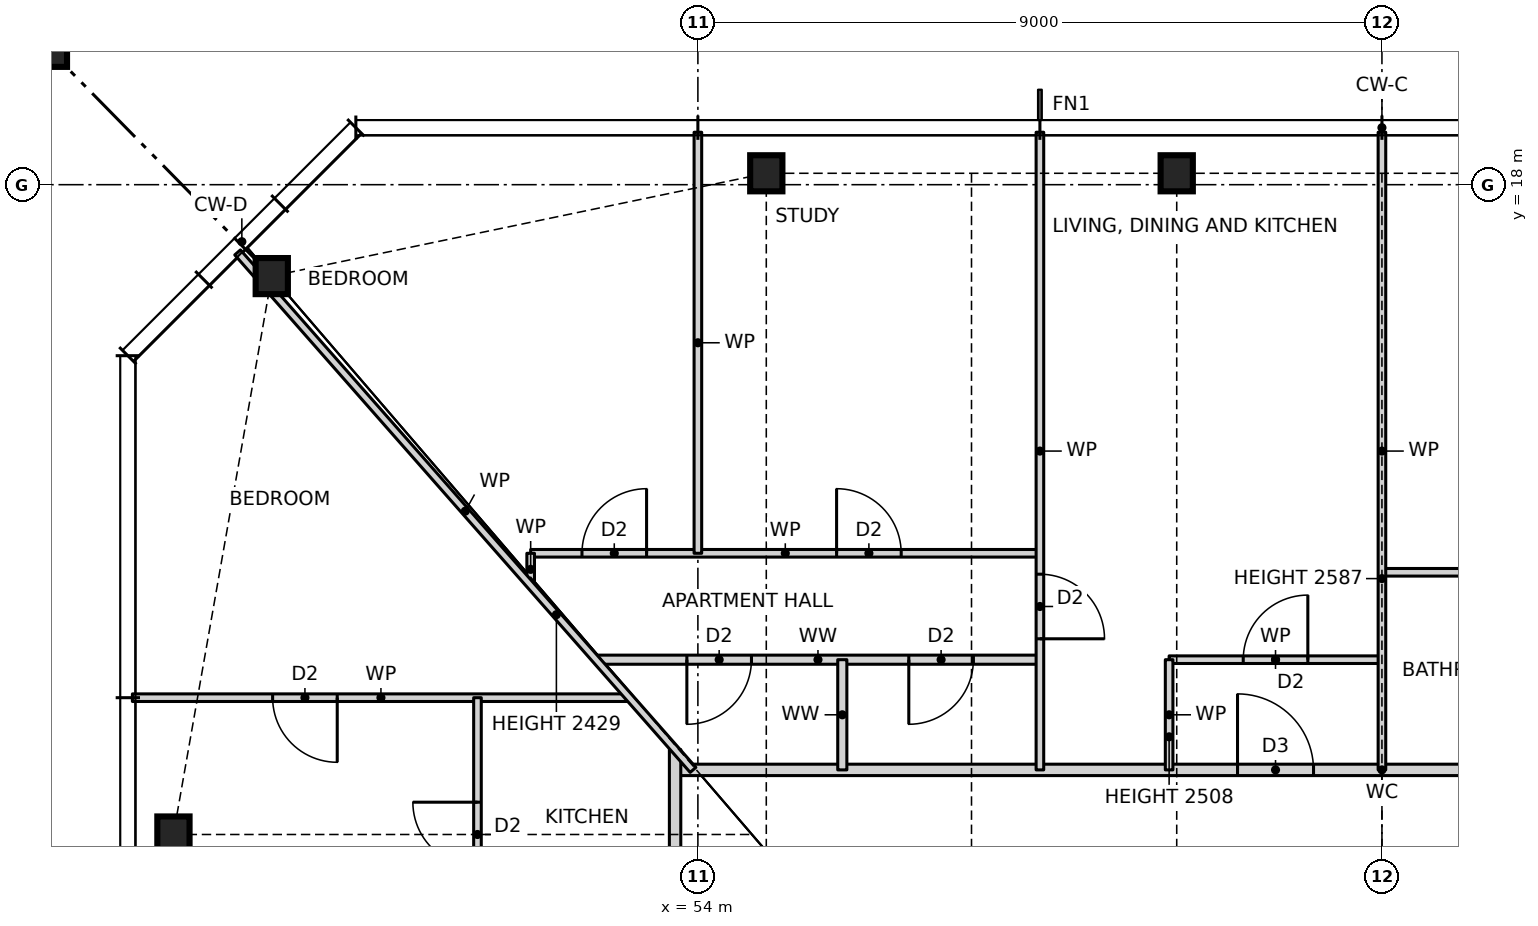
"""IFC4 building model, lengths in metres.
Left out: names, types, materials, properties, quantities, classifications, styles, units other than length and angle.
Written with IfcOpenShell. Run it as: python <this file> out.ifc"""

import sys

from ifc_helpers import new_model, si_unit, direction, frame, frame_2d, origin, origin_2d, place, context, subcontext, project, spatial, rectangle, hollow_rectangle, i_section, extrude, element, fill, save


model = new_model("IFC4")
c1 = context("Model", 3, precision=1e-05, world=origin(), true_north=direction((0.0, 1.0)))
c2 = subcontext(c1, "Body", "Model", "MODEL_VIEW")
j1 = project(units=[si_unit("LENGTHUNIT", "METRE"), si_unit("PLANEANGLEUNIT", "RADIAN")], contexts=[c1])
p1 = place(None, origin())
s1 = spatial("IfcSite", under=j1, at=p1, CompositionType="ELEMENT")
p2 = place(p1, origin())
s2 = spatial("IfcBuilding", under=s1, at=p2, CompositionType="ELEMENT")
p3 = place(p2, frame((0.0, 0.0, 67.5)))
s3 = spatial("IfcBuildingStorey", under=s2, at=p3, CompositionType="ELEMENT", Elevation=67.5)
for number, where, z_axis, x_axis in (
    (1, (60.3, 18.15, 0.0), (0.0, 0.0, 1.0), (1.0, 0.0, 0.0)),
    (2, (54.9, 18.15, 0.0), (0.0, 0.0, 1.0), (1.0, 0.0, 0.0)),
    (3, (48.394, 16.797, 0.0), (0.0, 0.0, 1.0), (1.0, 0.0, 0.0)),
    (4, (47.1, 9.45, 0.0), (0.0, 0.0, 1.0), (1.0, 0.0, 0.0)),
):
    element("IfcColumn", number, at=place(p3, frame(where, z_axis=z_axis, x_axis=x_axis)), inside=s3, PredefinedType="COLUMN", context=c2, shape_type="SweptSolid", body=[
        extrude(i_section(OverallWidth=0.424, OverallDepth=0.475, WebThickness=0.048, FlangeThickness=0.077, at=origin_2d()), origin(), (0.0, 0.0, 1.0), 3.5),
    ])
p4 = place(p3, frame((45.1, 20.15, 0.0), z_axis=(0.0, 0.0, 1.0), x_axis=(1.0, 0.0, 0.0)))
e5 = element("IfcColumn", 5, at=p4, inside=s3, PredefinedType="COLUMN", context=c2, shape_type="SweptSolid", body=[
    extrude(hollow_rectangle(XDim=1.2, YDim=1.2, WallThickness=0.07, at=origin_2d()), origin(), (0.0, 0.0, 1.0), 3.5),
])
p5 = place(p3, frame((53.7, 10.3, 0.0), z_axis=(0.0, 0.0, 1.0), x_axis=(1.0, 0.0, 0.0)))
e6 = element("IfcWall", 6, at=p5, inside=s3, PredefinedType="PARTITIONING", context=c2, shape_type="SweptSolid", body=[
    extrude(rectangle(XDim=18.6, YDim=0.15, at=frame_2d((9.3, 0.0))), origin(), (0.0, 0.0, 1.0), 3.27),
])
p6 = place(p5, frame((12.8, 0.0, 0.0)))
e7 = element("IfcOpeningElement", 7, at=p6, cuts=e6, PredefinedType="OPENING", context=c2, shape_type="SweptSolid", body=[
    extrude(rectangle(XDim=1.0, YDim=2.1, at=frame_2d((0.5, 1.05))), frame((0.0, 0.085, 0.0), z_axis=(0.0, -1.0, 0.0), x_axis=(1.0, 0.0, 0.0)), (0.0, 0.0, 1.0), 0.17),
])
p7 = place(p5, frame((7.4, 0.0, 0.0)))
e8 = element("IfcOpeningElement", 8, at=p7, cuts=e6, PredefinedType="OPENING", context=c2, shape_type="SweptSolid", body=[
    extrude(rectangle(XDim=1.0, YDim=2.1, at=frame_2d((0.5, 1.05))), frame((0.0, 0.085, 0.0), z_axis=(0.0, -1.0, 0.0), x_axis=(1.0, 0.0, 0.0)), (0.0, 0.0, 1.0), 0.17),
])
p8 = place(p3, frame((46.56, 11.25, 0.0), z_axis=(0.0, 0.0, 1.0), x_axis=(1.0, 0.0, 0.0)))
e9 = element("IfcWall", 9, at=p8, inside=s3, PredefinedType="PARTITIONING", context=c2, shape_type="SweptSolid", body=[
    extrude(rectangle(XDim=6.54, YDim=0.1, at=frame_2d((3.27, 0.0))), origin(), (0.0, 0.0, 1.0), 3.27),
])
p9 = place(p8, frame((1.845, 0.0, 0.0)))
e10 = element("IfcOpeningElement", 10, at=p9, cuts=e9, PredefinedType="OPENING", context=c2, shape_type="SweptSolid", body=[
    extrude(rectangle(XDim=0.85, YDim=2.1, at=frame_2d((0.425, 1.05))), frame((0.0, 0.06, 0.0), z_axis=(0.0, -1.0, 0.0), x_axis=(1.0, 0.0, 0.0)), (0.0, 0.0, 1.0), 0.12),
])
p10 = place(p3, frame((52.66, 11.75, 0.0), z_axis=(0.0, 0.0, 1.0), x_axis=(1.0, 0.0, 0.0)))
e11 = element("IfcWall", 11, at=p10, inside=s3, PredefinedType="PARTITIONING", context=c2, shape_type="SweptSolid", body=[
    extrude(rectangle(XDim=5.84, YDim=0.12, at=frame_2d((2.92, 0.0))), origin(), (0.0, 0.0, 1.0), 3.27),
])
p11 = place(p10, frame((4.115, 0.0, 0.0)))
e12 = element("IfcOpeningElement", 12, at=p11, cuts=e11, PredefinedType="OPENING", context=c2, shape_type="SweptSolid", body=[
    extrude(rectangle(XDim=0.85, YDim=2.1, at=frame_2d((0.425, 1.05))), frame((0.0, 0.07, 0.0), z_axis=(0.0, -1.0, 0.0), x_axis=(1.0, 0.0, 0.0)), (0.0, 0.0, 1.0), 0.14),
])
p12 = place(p10, frame((1.195, 0.0, 0.0)))
e13 = element("IfcOpeningElement", 13, at=p12, cuts=e11, PredefinedType="OPENING", context=c2, shape_type="SweptSolid", body=[
    extrude(rectangle(XDim=0.85, YDim=2.1, at=frame_2d((0.425, 1.05))), frame((0.0, 0.07, 0.0), z_axis=(0.0, -1.0, 0.0), x_axis=(1.0, 0.0, 0.0)), (0.0, 0.0, 1.0), 0.14),
])
p13 = place(p3, frame((60.2, 11.75, 0.0), z_axis=(0.0, 0.0, 1.0), x_axis=(1.0, 0.0, 0.0)))
e14 = element("IfcWall", 14, at=p13, inside=s3, PredefinedType="PARTITIONING", context=c2, shape_type="SweptSolid", body=[
    extrude(rectangle(XDim=2.8, YDim=0.1, at=frame_2d((1.4, 0.0))), origin(), (0.0, 0.0, 1.0), 3.27),
])
p14 = place(p13, frame((0.975, 0.0, 0.0)))
e15 = element("IfcOpeningElement", 15, at=p14, cuts=e14, PredefinedType="OPENING", context=c2, shape_type="SweptSolid", body=[
    extrude(rectangle(XDim=0.85, YDim=2.1, at=frame_2d((0.425, 1.05))), frame((0.0, 0.06, 0.0), z_axis=(0.0, -1.0, 0.0), x_axis=(1.0, 0.0, 0.0)), (0.0, 0.0, 1.0), 0.12),
])
p15 = place(p3, frame((63.0, 12.9, 0.0), z_axis=(0.0, 0.0, 1.0), x_axis=(1.0, 0.0, 0.0)))
e16 = element("IfcWall", 16, at=p15, inside=s3, PredefinedType="PARTITIONING", context=c2, shape_type="SweptSolid", body=[
    extrude(rectangle(XDim=9.0, YDim=0.1, at=frame_2d((4.5, 0.0))), origin(), (0.0, 0.0, 1.0), 3.27),
])
p16 = place(p15, frame((6.775, 0.0, 0.0)))
e17 = element("IfcOpeningElement", 17, at=p16, cuts=e16, PredefinedType="OPENING", context=c2, shape_type="SweptSolid", body=[
    extrude(rectangle(XDim=0.85, YDim=2.1, at=frame_2d((0.425, 1.05))), frame((0.0, 0.06, 0.0), z_axis=(0.0, -1.0, 0.0), x_axis=(1.0, 0.0, 0.0)), (0.0, 0.0, 1.0), 0.12),
])
p17 = place(p15, frame((3.575, 0.0, 0.0)))
e18 = element("IfcOpeningElement", 18, at=p17, cuts=e16, PredefinedType="OPENING", context=c2, shape_type="SweptSolid", body=[
    extrude(rectangle(XDim=0.85, YDim=2.1, at=frame_2d((0.425, 1.05))), frame((0.0, 0.06, 0.0), z_axis=(0.0, -1.0, 0.0), x_axis=(1.0, 0.0, 0.0)), (0.0, 0.0, 1.0), 0.12),
])
p18 = place(p3, frame((51.8, 13.15, 0.0), z_axis=(0.0, 0.0, 1.0), x_axis=(1.0, 0.0, 0.0)))
e19 = element("IfcWall", 19, at=p18, inside=s3, PredefinedType="PARTITIONING", context=c2, shape_type="SweptSolid", body=[
    extrude(rectangle(XDim=6.7, YDim=0.1, at=frame_2d((3.35, 0.0))), origin(), (0.0, 0.0, 1.0), 3.27),
])
p19 = place(p18, frame((4.025, 0.0, 0.0)))
e20 = element("IfcOpeningElement", 20, at=p19, cuts=e19, PredefinedType="OPENING", context=c2, shape_type="SweptSolid", body=[
    extrude(rectangle(XDim=0.85, YDim=2.1, at=frame_2d((0.425, 1.05))), frame((0.0, 0.06, 0.0), z_axis=(0.0, -1.0, 0.0), x_axis=(1.0, 0.0, 0.0)), (0.0, 0.0, 1.0), 0.12),
])
p20 = place(p18, frame((0.675, 0.0, 0.0)))
e21 = element("IfcOpeningElement", 21, at=p20, cuts=e19, PredefinedType="OPENING", context=c2, shape_type="SweptSolid", body=[
    extrude(rectangle(XDim=0.85, YDim=2.1, at=frame_2d((0.425, 1.05))), frame((0.0, 0.06, 0.0), z_axis=(0.0, -1.0, 0.0), x_axis=(1.0, 0.0, 0.0)), (0.0, 0.0, 1.0), 0.12),
])
p21 = place(p3, frame((63.0, 10.3, 0.0), z_axis=(0.0, 0.0, 1.0), x_axis=(0.0, 1.0, 0.0)))
e22 = element("IfcWall", 22, at=p21, inside=s3, PredefinedType="PARTITIONING", context=c2, shape_type="SweptSolid", body=[
    extrude(rectangle(XDim=8.39, YDim=0.1, at=frame_2d((4.195, 0.0))), origin(), (0.0, 0.0, 1.0), 2.587),
])
p22 = place(p3, frame((60.2, 10.3, 0.0), z_axis=(0.0, 0.0, 1.0), x_axis=(0.0, 1.0, 0.0)))
e23 = element("IfcWall", 23, at=p22, inside=s3, PredefinedType="PARTITIONING", context=c2, shape_type="SweptSolid", body=[
    extrude(rectangle(XDim=1.45, YDim=0.1, at=frame_2d((0.725, 0.0))), origin(), (0.0, 0.0, 1.0), 2.508),
])
p23 = place(p3, frame((58.5, 10.3, 0.0), z_axis=(0.0, 0.0, 1.0), x_axis=(0.0, 1.0, 0.0)))
e24 = element("IfcWall", 24, at=p23, inside=s3, PredefinedType="PARTITIONING", context=c2, shape_type="SweptSolid", body=[
    extrude(rectangle(XDim=8.39, YDim=0.1, at=frame_2d((4.195, 0.0))), origin(), (0.0, 0.0, 1.0), 3.27),
])
p24 = place(p23, frame((1.725, 0.0, 0.0)))
e25 = element("IfcOpeningElement", 25, at=p24, cuts=e24, PredefinedType="OPENING", context=c2, shape_type="SweptSolid", body=[
    extrude(rectangle(XDim=0.85, YDim=2.1, at=frame_2d((0.425, 1.05))), frame((0.0, 0.06, 0.0), z_axis=(0.0, -1.0, 0.0), x_axis=(1.0, 0.0, 0.0)), (0.0, 0.0, 1.0), 0.12),
])
p25 = place(p3, frame((55.9, 10.3, 0.0), z_axis=(0.0, 0.0, 1.0), x_axis=(0.0, 1.0, 0.0)))
e26 = element("IfcWall", 26, at=p25, inside=s3, PredefinedType="PARTITIONING", context=c2, shape_type="SweptSolid", body=[
    extrude(rectangle(XDim=1.45, YDim=0.12, at=frame_2d((0.725, 0.0))), origin(), (0.0, 0.0, 1.0), 3.27),
])
p26 = place(p3, frame((54.0, 13.15, 0.0), z_axis=(0.0, 0.0, 1.0), x_axis=(0.0, 1.0, 0.0)))
e27 = element("IfcWall", 27, at=p26, inside=s3, PredefinedType="PARTITIONING", context=c2, shape_type="SweptSolid", body=[
    extrude(rectangle(XDim=5.54, YDim=0.1, at=frame_2d((2.77, 0.0))), origin(), (0.0, 0.0, 1.0), 3.27),
])
p27 = place(p3, frame((53.7, -10.568, 0.0), z_axis=(0.0, 0.0, 1.0), x_axis=(0.0, 1.0, 0.0)))
e28 = element("IfcWall", 28, at=p27, inside=s3, PredefinedType="PARTITIONING", context=c2, shape_type="SweptSolid", body=[
    extrude(rectangle(XDim=21.136, YDim=0.15, at=frame_2d((10.568, 0.0))), origin(), (0.0, 0.0, 1.0), 3.27),
])
p28 = place(p27, frame((16.318, 0.0, 0.0)))
e29 = element("IfcOpeningElement", 29, at=p28, cuts=e28, PredefinedType="OPENING", context=c2, shape_type="SweptSolid", body=[
    extrude(rectangle(XDim=1.0, YDim=2.1, at=frame_2d((0.5, 1.05))), frame((0.0, 0.085, 0.0), z_axis=(0.0, -1.0, 0.0), x_axis=(1.0, 0.0, 0.0)), (0.0, 0.0, 1.0), 0.17),
])
p29 = place(p27, frame((10.918, 0.0, 0.0)))
e30 = element("IfcOpeningElement", 30, at=p29, cuts=e28, PredefinedType="OPENING", context=c2, shape_type="SweptSolid", body=[
    extrude(rectangle(XDim=1.0, YDim=2.1, at=frame_2d((0.5, 1.05))), frame((0.0, 0.085, 0.0), z_axis=(0.0, -1.0, 0.0), x_axis=(1.0, 0.0, 0.0)), (0.0, 0.0, 1.0), 0.17),
])
p30 = place(p3, frame((51.8, 12.727, 0.0), z_axis=(0.0, 0.0, 1.0), x_axis=(0.0, 1.0, 0.0)))
e31 = element("IfcWall", 31, at=p30, inside=s3, PredefinedType="PARTITIONING", context=c2, shape_type="SweptSolid", body=[
    extrude(rectangle(XDim=0.423, YDim=0.1, at=frame_2d((0.211, 0.0))), origin(), (0.0, 0.0, 1.0), 3.27),
])
p31 = place(p3, frame((51.1, 2.25, 0.0), z_axis=(0.0, 0.0, 1.0), x_axis=(0.0, 1.0, 0.0)))
e32 = element("IfcWall", 32, at=p31, inside=s3, PredefinedType="PARTITIONING", context=c2, shape_type="SweptSolid", body=[
    extrude(rectangle(XDim=9.0, YDim=0.1, at=frame_2d((4.5, 0.0))), origin(), (0.0, 0.0, 1.0), 3.27),
])
p32 = place(p31, frame((6.775, 0.0, 0.0)))
e33 = element("IfcOpeningElement", 33, at=p32, cuts=e32, PredefinedType="OPENING", context=c2, shape_type="SweptSolid", body=[
    extrude(rectangle(XDim=0.85, YDim=2.1, at=frame_2d((0.425, 1.05))), frame((0.0, 0.06, 0.0), z_axis=(0.0, -1.0, 0.0), x_axis=(1.0, 0.0, 0.0)), (0.0, 0.0, 1.0), 0.12),
])
p33 = place(p31, frame((3.575, 0.0, 0.0)))
e34 = element("IfcOpeningElement", 34, at=p33, cuts=e32, PredefinedType="OPENING", context=c2, shape_type="SweptSolid", body=[
    extrude(rectangle(XDim=0.85, YDim=2.1, at=frame_2d((0.425, 1.05))), frame((0.0, 0.06, 0.0), z_axis=(0.0, -1.0, 0.0), x_axis=(1.0, 0.0, 0.0)), (0.0, 0.0, 1.0), 0.12),
])
p34 = place(p3, frame((53.936, 10.3, 0.0), z_axis=(0.0, 0.0, 1.0), x_axis=(-0.660638210404, 0.750704439146, 0.0)))
e35 = element("IfcWall", 35, at=p34, inside=s3, PredefinedType="PARTITIONING", context=c2, shape_type="SweptSolid", body=[
    extrude(rectangle(XDim=9.07, YDim=0.1, at=frame_2d((4.535, 0.0))), origin(), (0.0, 0.0, 1.0), 2.429),
])
p35 = place(p7, origin())
e36 = element("IfcDoor", 36, at=p35, inside=s3, OperationType="SINGLE_SWING_LEFT", PredefinedType="DOOR", context=c2, shape_type="SweptSolid", body=[
    extrude(rectangle(XDim=1.0, YDim=2.1, at=frame_2d((0.5, 1.05))), frame((0.0, 0.025, 0.0), z_axis=(0.0, -1.0, 0.0), x_axis=(1.0, 0.0, 0.0)), (0.0, 0.0, 1.0), 0.05),
])
fill(e8, e36)
p36 = place(p14, origin())
e37 = element("IfcDoor", 37, at=p36, inside=s3, OperationType="SINGLE_SWING_RIGHT", PredefinedType="DOOR", context=c2, shape_type="SweptSolid", body=[
    extrude(rectangle(XDim=0.85, YDim=2.1, at=frame_2d((0.425, 1.05))), frame((0.0, 0.025, 0.0), z_axis=(0.0, -1.0, 0.0), x_axis=(1.0, 0.0, 0.0)), (0.0, 0.0, 1.0), 0.05),
])
fill(e15, e37)
p37 = place(p24, frame((0.85, 0.0, 0.0), z_axis=(0.0, 0.0, 1.0), x_axis=(-1.0, 0.0, 0.0)))
e38 = element("IfcDoor", 38, at=p37, inside=s3, OperationType="SINGLE_SWING_RIGHT", PredefinedType="DOOR", context=c2, shape_type="SweptSolid", body=[
    extrude(rectangle(XDim=0.85, YDim=2.1, at=frame_2d((0.425, 1.05))), frame((0.0, 0.025, 0.0), z_axis=(0.0, -1.0, 0.0), x_axis=(1.0, 0.0, 0.0)), (0.0, 0.0, 1.0), 0.05),
])
fill(e25, e38)
p38 = place(p19, origin())
e39 = element("IfcDoor", 39, at=p38, inside=s3, OperationType="SINGLE_SWING_LEFT", PredefinedType="DOOR", context=c2, shape_type="SweptSolid", body=[
    extrude(rectangle(XDim=0.85, YDim=2.1, at=frame_2d((0.425, 1.05))), frame((0.0, 0.025, 0.0), z_axis=(0.0, -1.0, 0.0), x_axis=(1.0, 0.0, 0.0)), (0.0, 0.0, 1.0), 0.05),
])
fill(e20, e39)
p39 = place(p20, origin())
e40 = element("IfcDoor", 40, at=p39, inside=s3, OperationType="SINGLE_SWING_RIGHT", PredefinedType="DOOR", context=c2, shape_type="SweptSolid", body=[
    extrude(rectangle(XDim=0.85, YDim=2.1, at=frame_2d((0.425, 1.05))), frame((0.0, 0.025, 0.0), z_axis=(0.0, -1.0, 0.0), x_axis=(1.0, 0.0, 0.0)), (0.0, 0.0, 1.0), 0.05),
])
fill(e21, e40)
p40 = place(p11, frame((0.85, 0.0, 0.0), z_axis=(0.0, 0.0, 1.0), x_axis=(-1.0, 0.0, 0.0)))
e41 = element("IfcDoor", 41, at=p40, inside=s3, OperationType="SINGLE_SWING_RIGHT", PredefinedType="DOOR", context=c2, shape_type="SweptSolid", body=[
    extrude(rectangle(XDim=0.85, YDim=2.1, at=frame_2d((0.425, 1.05))), frame((0.0, 0.025, 0.0), z_axis=(0.0, -1.0, 0.0), x_axis=(1.0, 0.0, 0.0)), (0.0, 0.0, 1.0), 0.05),
])
fill(e12, e41)
p41 = place(p12, frame((0.85, 0.0, 0.0), z_axis=(0.0, 0.0, 1.0), x_axis=(-1.0, 0.0, 0.0)))
e42 = element("IfcDoor", 42, at=p41, inside=s3, OperationType="SINGLE_SWING_RIGHT", PredefinedType="DOOR", context=c2, shape_type="SweptSolid", body=[
    extrude(rectangle(XDim=0.85, YDim=2.1, at=frame_2d((0.425, 1.05))), frame((0.0, 0.025, 0.0), z_axis=(0.0, -1.0, 0.0), x_axis=(1.0, 0.0, 0.0)), (0.0, 0.0, 1.0), 0.05),
])
fill(e13, e42)
p42 = place(p32, origin())
e43 = element("IfcDoor", 43, at=p42, inside=s3, OperationType="SINGLE_SWING_RIGHT", PredefinedType="DOOR", context=c2, shape_type="SweptSolid", body=[
    extrude(rectangle(XDim=0.85, YDim=2.1, at=frame_2d((0.425, 1.05))), frame((0.0, 0.025, 0.0), z_axis=(0.0, -1.0, 0.0), x_axis=(1.0, 0.0, 0.0)), (0.0, 0.0, 1.0), 0.05),
])
fill(e33, e43)
p43 = place(p9, frame((0.85, 0.0, 0.0), z_axis=(0.0, 0.0, 1.0), x_axis=(-1.0, 0.0, 0.0)))
e44 = element("IfcDoor", 44, at=p43, inside=s3, OperationType="SINGLE_SWING_LEFT", PredefinedType="DOOR", context=c2, shape_type="SweptSolid", body=[
    extrude(rectangle(XDim=0.85, YDim=2.1, at=frame_2d((0.425, 1.05))), frame((0.0, 0.025, 0.0), z_axis=(0.0, -1.0, 0.0), x_axis=(1.0, 0.0, 0.0)), (0.0, 0.0, 1.0), 0.05),
])
fill(e10, e44)
save(model, sys.argv[1])
